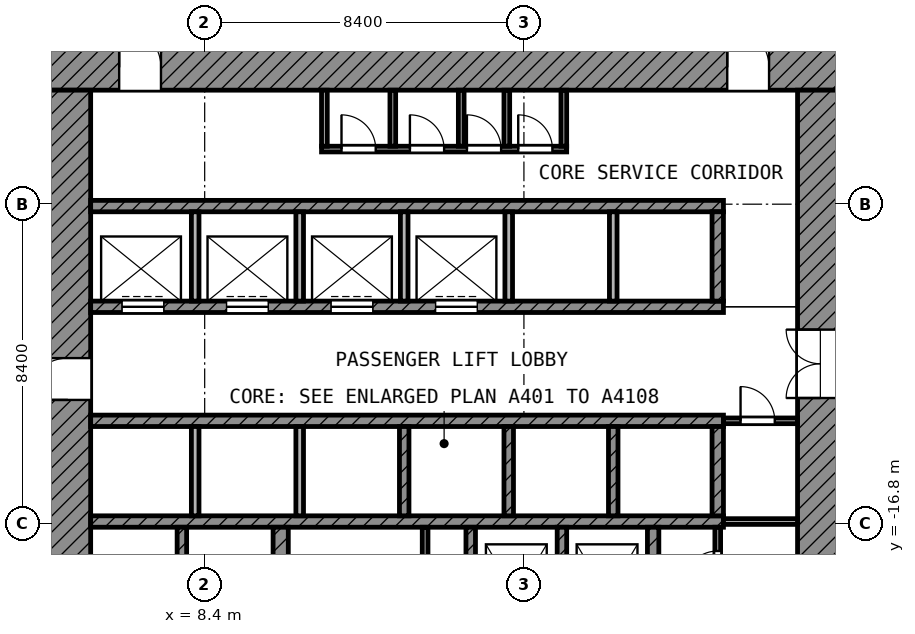
"""IFC4 building model, lengths in metres.
Left out: names, types, materials, properties, quantities, classifications, styles, units other than length and angle.
Written with IfcOpenShell. Run it as: python <this file> out.ifc"""

import sys

from ifc_helpers import new_model, si_unit, direction, frame, frame_2d, origin, place, context, subcontext, project, spatial, rectangle, extrude, element, fill, save


model = new_model("IFC4")
c1 = context("Model", 3, precision=1e-05, world=origin(), true_north=direction((0.0, 1.0)))
c2 = subcontext(c1, "Body", "Model", "MODEL_VIEW")
j1 = project(units=[si_unit("LENGTHUNIT", "METRE"), si_unit("PLANEANGLEUNIT", "RADIAN")], contexts=[c1])
p1 = place(None, origin())
s1 = spatial("IfcSite", under=j1, at=p1, CompositionType="ELEMENT")
p2 = place(p1, origin())
s2 = spatial("IfcBuilding", under=s1, at=p2, CompositionType="ELEMENT")
p3 = place(p2, frame((0.0, 0.0, 29.0)))
s3 = spatial("IfcBuildingStorey", under=s2, at=p3, CompositionType="ELEMENT", Elevation=29.0)
p4 = place(p3, frame((4.2, -4.8, 0.0), z_axis=(0.0, 0.0, 1.0), x_axis=(1.0, 0.0, 0.0)))
e1 = element("IfcWall", 1, at=p4, inside=s3, PredefinedType="SHEAR", context=c2, shape_type="SweptSolid", body=[
    extrude(rectangle(XDim=21.0, YDim=1.2, at=frame_2d((10.5, 0.0))), origin(), (0.0, 0.0, 1.0), 4.7),
])
p5 = place(p4, frame((1.95, 0.0, 0.0)))
e2 = element("IfcOpeningElement", 2, at=p5, cuts=e1, PredefinedType="OPENING", context=c2, shape_type="SweptSolid", body=[
    extrude(rectangle(XDim=1.1, YDim=2.1, at=frame_2d((0.55, 1.05))), frame((0.0, 0.61, 0.0), z_axis=(0.0, -1.0, 0.0), x_axis=(1.0, 0.0, 0.0)), (0.0, 0.0, 1.0), 1.22),
])
p6 = place(p4, frame((17.95, 0.0, 0.0)))
e3 = element("IfcOpeningElement", 3, at=p6, cuts=e1, PredefinedType="OPENING", context=c2, shape_type="SweptSolid", body=[
    extrude(rectangle(XDim=1.1, YDim=2.1, at=frame_2d((0.55, 1.05))), frame((0.0, 0.61, 0.0), z_axis=(0.0, -1.0, 0.0), x_axis=(1.0, 0.0, 0.0)), (0.0, 0.0, 1.0), 1.22),
])
p7 = place(p3, frame((4.8, -25.2, 0.0), z_axis=(0.0, 0.0, 1.0), x_axis=(0.0, 1.0, 0.0)))
e4 = element("IfcWall", 4, at=p7, inside=s3, PredefinedType="SHEAR", context=c2, shape_type="SweptSolid", body=[
    extrude(rectangle(XDim=19.8, YDim=1.2, at=frame_2d((9.9, 0.0))), origin(), (0.0, 0.0, 1.0), 4.7),
])
p8 = place(p7, frame((11.65, 0.0, 0.0)))
e5 = element("IfcOpeningElement", 5, at=p8, cuts=e4, PredefinedType="OPENING", context=c2, shape_type="SweptSolid", body=[
    extrude(rectangle(XDim=1.1, YDim=2.1, at=frame_2d((0.55, 1.05))), frame((0.0, 0.61, 0.0), z_axis=(0.0, -1.0, 0.0), x_axis=(1.0, 0.0, 0.0)), (0.0, 0.0, 1.0), 1.22),
])
p9 = place(p7, frame((2.35, 0.0, 0.0)))
e6 = element("IfcOpeningElement", 6, at=p9, cuts=e4, PredefinedType="OPENING", context=c2, shape_type="SweptSolid", body=[
    extrude(rectangle(XDim=1.1, YDim=2.1, at=frame_2d((0.55, 1.05))), frame((0.0, 0.61, 0.0), z_axis=(0.0, -1.0, 0.0), x_axis=(1.0, 0.0, 0.0)), (0.0, 0.0, 1.0), 1.22),
])
p10 = place(p3, frame((24.6, -24.0, 0.0), z_axis=(0.0, 0.0, 1.0), x_axis=(0.0, 1.0, 0.0)))
e7 = element("IfcWall", 7, at=p10, inside=s3, PredefinedType="SHEAR", context=c2, shape_type="SweptSolid", body=[
    extrude(rectangle(XDim=18.6, YDim=1.2, at=frame_2d((9.3, 0.0))), origin(), (0.0, 0.0, 1.0), 4.7),
])
p11 = place(p10, frame((10.5, 0.0, 0.0)))
e8 = element("IfcOpeningElement", 8, at=p11, cuts=e7, PredefinedType="OPENING", context=c2, shape_type="SweptSolid", body=[
    extrude(rectangle(XDim=1.8, YDim=2.1, at=frame_2d((0.9, 1.05))), frame((0.0, 0.61, 0.0), z_axis=(0.0, -1.0, 0.0), x_axis=(1.0, 0.0, 0.0)), (0.0, 0.0, 1.0), 1.22),
])
p12 = place(p3, frame((5.4, -8.45, 0.0), z_axis=(0.0, 0.0, 1.0), x_axis=(1.0, 0.0, 0.0)))
e9 = element("IfcWall", 9, at=p12, inside=s3, PredefinedType="SHEAR", context=c2, shape_type="SweptSolid", body=[
    extrude(rectangle(XDim=16.65, YDim=0.3, at=frame_2d((8.325, 0.0))), origin(), (0.0, 0.0, 1.0), 4.7),
])
p13 = place(p3, frame((5.4, -11.1, 0.0), z_axis=(0.0, 0.0, 1.0), x_axis=(1.0, 0.0, 0.0)))
e10 = element("IfcWall", 10, at=p13, inside=s3, PredefinedType="SHEAR", context=c2, shape_type="SweptSolid", body=[
    extrude(rectangle(XDim=16.65, YDim=0.3, at=frame_2d((8.325, 0.0))), origin(), (0.0, 0.0, 1.0), 4.7),
])
p14 = place(p13, frame((0.825, 0.0, 0.0)))
e11 = element("IfcOpeningElement", 11, at=p14, cuts=e10, PredefinedType="OPENING", context=c2, shape_type="SweptSolid", body=[
    extrude(rectangle(XDim=1.1, YDim=2.1, at=frame_2d((0.55, 1.05))), frame((0.0, 0.16, 0.0), z_axis=(0.0, -1.0, 0.0), x_axis=(1.0, 0.0, 0.0)), (0.0, 0.0, 1.0), 0.32),
])
p15 = place(p13, frame((3.575, 0.0, 0.0)))
e12 = element("IfcOpeningElement", 12, at=p15, cuts=e10, PredefinedType="OPENING", context=c2, shape_type="SweptSolid", body=[
    extrude(rectangle(XDim=1.1, YDim=2.1, at=frame_2d((0.55, 1.05))), frame((0.0, 0.16, 0.0), z_axis=(0.0, -1.0, 0.0), x_axis=(1.0, 0.0, 0.0)), (0.0, 0.0, 1.0), 0.32),
])
p16 = place(p13, frame((6.325, 0.0, 0.0)))
e13 = element("IfcOpeningElement", 13, at=p16, cuts=e10, PredefinedType="OPENING", context=c2, shape_type="SweptSolid", body=[
    extrude(rectangle(XDim=1.1, YDim=2.1, at=frame_2d((0.55, 1.05))), frame((0.0, 0.16, 0.0), z_axis=(0.0, -1.0, 0.0), x_axis=(1.0, 0.0, 0.0)), (0.0, 0.0, 1.0), 0.32),
])
p17 = place(p13, frame((9.075, 0.0, 0.0)))
e14 = element("IfcOpeningElement", 14, at=p17, cuts=e10, PredefinedType="OPENING", context=c2, shape_type="SweptSolid", body=[
    extrude(rectangle(XDim=1.1, YDim=2.1, at=frame_2d((0.55, 1.05))), frame((0.0, 0.16, 0.0), z_axis=(0.0, -1.0, 0.0), x_axis=(1.0, 0.0, 0.0)), (0.0, 0.0, 1.0), 0.32),
])
for number, where, z_axis, x_axis in (
    (15, (5.4, -14.1, 0.0), (0.0, 0.0, 1.0), (1.0, 0.0, 0.0)),
    (16, (5.4, -16.75, 0.0), (0.0, 0.0, 1.0), (1.0, 0.0, 0.0)),
):
    element("IfcWall", number, at=place(p3, frame(where, z_axis=z_axis, x_axis=x_axis)), inside=s3, PredefinedType="SHEAR", context=c2, shape_type="SweptSolid", body=[
        extrude(rectangle(XDim=16.65, YDim=0.3, at=frame_2d((8.325, 0.0))), origin(), (0.0, 0.0, 1.0), 4.7),
    ])
p18 = place(p3, frame((10.4, -20.05, 0.0), z_axis=(0.0, 0.0, 1.0), x_axis=(0.0, 1.0, 0.0)))
e17 = element("IfcWall", 17, at=p18, inside=s3, PredefinedType="SHEAR", context=c2, shape_type="SweptSolid", body=[
    extrude(rectangle(XDim=3.15, YDim=0.4, at=frame_2d((1.575, 0.0))), origin(), (0.0, 0.0, 1.0), 4.7),
])
p19 = place(p3, frame((20.2, -20.35, 0.0), z_axis=(0.0, 0.0, 1.0), x_axis=(0.0, 1.0, 0.0)))
e18 = element("IfcWall", 18, at=p19, inside=s3, PredefinedType="SHEAR", context=c2, shape_type="SweptSolid", body=[
    extrude(rectangle(XDim=3.45, YDim=0.3, at=frame_2d((1.725, 0.0))), origin(), (0.0, 0.0, 1.0), 4.7),
])
p20 = place(p3, frame((21.9, -10.95, 0.0), z_axis=(0.0, 0.0, 1.0), x_axis=(0.0, 1.0, 0.0)))
e19 = element("IfcWall", 19, at=p20, inside=s3, PredefinedType="SHEAR", context=c2, shape_type="SweptSolid", body=[
    extrude(rectangle(XDim=2.35, YDim=0.3, at=frame_2d((1.175, 0.0))), origin(), (0.0, 0.0, 1.0), 4.7),
])
p21 = place(p3, frame((21.9, -16.6, 0.0), z_axis=(0.0, 0.0, 1.0), x_axis=(0.0, 1.0, 0.0)))
e20 = element("IfcWall", 20, at=p21, inside=s3, PredefinedType="SHEAR", context=c2, shape_type="SweptSolid", body=[
    extrude(rectangle(XDim=2.35, YDim=0.3, at=frame_2d((1.175, 0.0))), origin(), (0.0, 0.0, 1.0), 4.7),
])
for number, where, z_axis, x_axis in (
    (21, (7.8, -20.05, 0.0), (0.0, 0.0, 1.0), (0.0, 1.0, 0.0)),
    (22, (15.4, -20.05, 0.0), (0.0, 0.0, 1.0), (0.0, 1.0, 0.0)),
    (23, (17.8, -20.05, 0.0), (0.0, 0.0, 1.0), (0.0, 1.0, 0.0)),
):
    element("IfcWall", number, at=place(p3, frame(where, z_axis=z_axis, x_axis=x_axis)), inside=s3, PredefinedType="SHEAR", context=c2, shape_type="SweptSolid", body=[
        extrude(rectangle(XDim=3.15, YDim=0.25, at=frame_2d((1.575, 0.0))), origin(), (0.0, 0.0, 1.0), 4.7),
    ])
for number, where, z_axis, x_axis in (
    (24, (8.15, -10.95, 0.0), (0.0, 0.0, 1.0), (0.0, 1.0, 0.0)),
    (25, (10.9, -10.95, 0.0), (0.0, 0.0, 1.0), (0.0, 1.0, 0.0)),
    (26, (13.65, -10.95, 0.0), (0.0, 0.0, 1.0), (0.0, 1.0, 0.0)),
    (27, (16.4, -10.95, 0.0), (0.0, 0.0, 1.0), (0.0, 1.0, 0.0)),
    (28, (19.15, -10.95, 0.0), (0.0, 0.0, 1.0), (0.0, 1.0, 0.0)),
):
    element("IfcWall", number, at=place(p3, frame(where, z_axis=z_axis, x_axis=x_axis)), inside=s3, PredefinedType="PARTITIONING", context=c2, shape_type="SweptSolid", body=[
        extrude(rectangle(XDim=2.35, YDim=0.2, at=frame_2d((1.175, 0.0))), origin(), (0.0, 0.0, 1.0), 4.7),
    ])
for number, where, z_axis, x_axis in (
    (29, (8.15, -16.6, 0.0), (0.0, 0.0, 1.0), (0.0, 1.0, 0.0)),
    (30, (10.9, -16.6, 0.0), (0.0, 0.0, 1.0), (0.0, 1.0, 0.0)),
):
    element("IfcWall", number, at=place(p3, frame(where, z_axis=z_axis, x_axis=x_axis)), inside=s3, PredefinedType="PARTITIONING", context=c2, shape_type="SweptSolid", body=[
        extrude(rectangle(XDim=2.35, YDim=0.2, at=frame_2d((1.175, 0.0))), origin(), (0.0, 0.0, 1.0), 4.7),
    ])
for number, where, z_axis, x_axis in (
    (31, (13.65, -16.6, 0.0), (0.0, 0.0, 1.0), (0.0, 1.0, 0.0)),
    (32, (16.4, -16.6, 0.0), (0.0, 0.0, 1.0), (0.0, 1.0, 0.0)),
    (33, (19.15, -16.6, 0.0), (0.0, 0.0, 1.0), (0.0, 1.0, 0.0)),
):
    element("IfcWall", number, at=place(p3, frame(where, z_axis=z_axis, x_axis=x_axis)), inside=s3, PredefinedType="SHEAR", context=c2, shape_type="SweptSolid", body=[
        extrude(rectangle(XDim=2.35, YDim=0.25, at=frame_2d((1.175, 0.0))), origin(), (0.0, 0.0, 1.0), 4.7),
    ])
p22 = place(p3, frame((21.9, -19.05, 0.0), z_axis=(0.0, 0.0, 1.0), x_axis=(0.0, 1.0, 0.0)))
e34 = element("IfcWall", 34, at=p22, inside=s3, PredefinedType="PARTITIONING", context=c2, shape_type="SweptSolid", body=[
    extrude(rectangle(XDim=2.15, YDim=0.15, at=frame_2d((1.075, 0.0))), origin(), (0.0, 0.0, 1.0), 4.7),
])
p23 = place(p22, frame((0.625, 0.0, 0.0)))
e35 = element("IfcOpeningElement", 35, at=p23, cuts=e34, PredefinedType="OPENING", context=c2, shape_type="SweptSolid", body=[
    extrude(rectangle(XDim=0.9, YDim=2.1, at=frame_2d((0.45, 1.05))), frame((0.0, 0.085, 0.0), z_axis=(0.0, -1.0, 0.0), x_axis=(1.0, 0.0, 0.0)), (0.0, 0.0, 1.0), 0.17),
])
p24 = place(p3, frame((22.05, -16.75, 0.0), z_axis=(0.0, 0.0, 1.0), x_axis=(1.0, 0.0, 0.0)))
e36 = element("IfcWall", 36, at=p24, inside=s3, PredefinedType="PARTITIONING", context=c2, shape_type="SweptSolid", body=[
    extrude(rectangle(XDim=1.95, YDim=0.15, at=frame_2d((0.975, 0.0))), origin(), (0.0, 0.0, 1.0), 4.7),
])
p25 = place(p3, frame((22.05, -14.1, 0.0), z_axis=(0.0, 0.0, 1.0), x_axis=(1.0, 0.0, 0.0)))
e37 = element("IfcWall", 37, at=p25, inside=s3, PredefinedType="PARTITIONING", context=c2, shape_type="SweptSolid", body=[
    extrude(rectangle(XDim=1.95, YDim=0.15, at=frame_2d((0.975, 0.0))), origin(), (0.0, 0.0, 1.0), 4.7),
])
p26 = place(p25, frame((0.45, 0.0, 0.0)))
e38 = element("IfcOpeningElement", 38, at=p26, cuts=e37, PredefinedType="OPENING", context=c2, shape_type="SweptSolid", body=[
    extrude(rectangle(XDim=0.9, YDim=2.1, at=frame_2d((0.45, 1.05))), frame((0.0, 0.085, 0.0), z_axis=(0.0, -1.0, 0.0), x_axis=(1.0, 0.0, 0.0)), (0.0, 0.0, 1.0), 0.17),
])
p27 = place(p3, frame((11.475, -6.95, 0.0), z_axis=(0.0, 0.0, 1.0), x_axis=(1.0, 0.0, 0.0)))
e39 = element("IfcWall", 39, at=p27, inside=s3, PredefinedType="PARTITIONING", context=c2, shape_type="SweptSolid", body=[
    extrude(rectangle(XDim=6.45, YDim=0.15, at=frame_2d((3.225, 0.0))), origin(), (0.0, 0.0, 1.0), 4.7),
])
p28 = place(p27, frame((0.525, 0.0, 0.0)))
e40 = element("IfcOpeningElement", 40, at=p28, cuts=e39, PredefinedType="OPENING", context=c2, shape_type="SweptSolid", body=[
    extrude(rectangle(XDim=0.9, YDim=2.1, at=frame_2d((0.45, 1.05))), frame((0.0, 0.085, 0.0), z_axis=(0.0, -1.0, 0.0), x_axis=(1.0, 0.0, 0.0)), (0.0, 0.0, 1.0), 0.17),
])
p29 = place(p27, frame((2.325, 0.0, 0.0)))
e41 = element("IfcOpeningElement", 41, at=p29, cuts=e39, PredefinedType="OPENING", context=c2, shape_type="SweptSolid", body=[
    extrude(rectangle(XDim=0.9, YDim=2.1, at=frame_2d((0.45, 1.05))), frame((0.0, 0.085, 0.0), z_axis=(0.0, -1.0, 0.0), x_axis=(1.0, 0.0, 0.0)), (0.0, 0.0, 1.0), 0.17),
])
p30 = place(p27, frame((3.825, 0.0, 0.0)))
e42 = element("IfcOpeningElement", 42, at=p30, cuts=e39, PredefinedType="OPENING", context=c2, shape_type="SweptSolid", body=[
    extrude(rectangle(XDim=0.9, YDim=2.1, at=frame_2d((0.45, 1.05))), frame((0.0, 0.085, 0.0), z_axis=(0.0, -1.0, 0.0), x_axis=(1.0, 0.0, 0.0)), (0.0, 0.0, 1.0), 0.17),
])
p31 = place(p27, frame((5.175, 0.0, 0.0)))
e43 = element("IfcOpeningElement", 43, at=p31, cuts=e39, PredefinedType="OPENING", context=c2, shape_type="SweptSolid", body=[
    extrude(rectangle(XDim=0.9, YDim=2.1, at=frame_2d((0.45, 1.05))), frame((0.0, 0.085, 0.0), z_axis=(0.0, -1.0, 0.0), x_axis=(1.0, 0.0, 0.0)), (0.0, 0.0, 1.0), 0.17),
])
for number, where, z_axis, x_axis in (
    (44, (11.55, -6.875, 0.0), (0.0, 0.0, 1.0), (0.0, 1.0, 0.0)),
    (45, (13.35, -6.875, 0.0), (0.0, 0.0, 1.0), (0.0, 1.0, 0.0)),
):
    element("IfcWall", number, at=place(p3, frame(where, z_axis=z_axis, x_axis=x_axis)), inside=s3, PredefinedType="PARTITIONING", context=c2, shape_type="SweptSolid", body=[
        extrude(rectangle(XDim=1.475, YDim=0.15, at=frame_2d((0.738, 0.0))), origin(), (0.0, 0.0, 1.0), 4.7),
    ])
p32 = place(p3, frame((14.2, -20.05, 0.0), z_axis=(0.0, 0.0, 1.0), x_axis=(0.0, 1.0, 0.0)))
e46 = element("IfcWall", 46, at=p32, inside=s3, PredefinedType="PARTITIONING", context=c2, shape_type="SweptSolid", body=[
    extrude(rectangle(XDim=3.15, YDim=0.15, at=frame_2d((1.575, 0.0))), origin(), (0.0, 0.0, 1.0), 4.7),
])
for number, where, z_axis, x_axis in (
    (47, (15.15, -6.875, 0.0), (0.0, 0.0, 1.0), (0.0, 1.0, 0.0)),
    (48, (16.35, -6.875, 0.0), (0.0, 0.0, 1.0), (0.0, 1.0, 0.0)),
    (49, (17.85, -6.875, 0.0), (0.0, 0.0, 1.0), (0.0, 1.0, 0.0)),
):
    element("IfcWall", number, at=place(p3, frame(where, z_axis=z_axis, x_axis=x_axis)), inside=s3, PredefinedType="PARTITIONING", context=c2, shape_type="SweptSolid", body=[
        extrude(rectangle(XDim=1.475, YDim=0.15, at=frame_2d((0.738, 0.0))), origin(), (0.0, 0.0, 1.0), 4.7),
    ])
p33 = place(p14, origin())
e50 = element("IfcDoor", 50, at=p33, inside=s3, OperationType="DOUBLE_DOOR_SLIDING", PredefinedType="DOOR", context=c2, shape_type="SweptSolid", body=[
    extrude(rectangle(XDim=1.1, YDim=2.1, at=frame_2d((0.55, 1.05))), frame((0.0, 0.025, 0.0), z_axis=(0.0, -1.0, 0.0), x_axis=(1.0, 0.0, 0.0)), (0.0, 0.0, 1.0), 0.05),
])
fill(e11, e50)
p34 = place(p15, origin())
e51 = element("IfcDoor", 51, at=p34, inside=s3, OperationType="DOUBLE_DOOR_SLIDING", PredefinedType="DOOR", context=c2, shape_type="SweptSolid", body=[
    extrude(rectangle(XDim=1.1, YDim=2.1, at=frame_2d((0.55, 1.05))), frame((0.0, 0.025, 0.0), z_axis=(0.0, -1.0, 0.0), x_axis=(1.0, 0.0, 0.0)), (0.0, 0.0, 1.0), 0.05),
])
fill(e12, e51)
p35 = place(p16, origin())
e52 = element("IfcDoor", 52, at=p35, inside=s3, OperationType="DOUBLE_DOOR_SLIDING", PredefinedType="DOOR", context=c2, shape_type="SweptSolid", body=[
    extrude(rectangle(XDim=1.1, YDim=2.1, at=frame_2d((0.55, 1.05))), frame((0.0, 0.025, 0.0), z_axis=(0.0, -1.0, 0.0), x_axis=(1.0, 0.0, 0.0)), (0.0, 0.0, 1.0), 0.05),
])
fill(e13, e52)
p36 = place(p17, origin())
e53 = element("IfcDoor", 53, at=p36, inside=s3, OperationType="DOUBLE_DOOR_SLIDING", PredefinedType="DOOR", context=c2, shape_type="SweptSolid", body=[
    extrude(rectangle(XDim=1.1, YDim=2.1, at=frame_2d((0.55, 1.05))), frame((0.0, 0.025, 0.0), z_axis=(0.0, -1.0, 0.0), x_axis=(1.0, 0.0, 0.0)), (0.0, 0.0, 1.0), 0.05),
])
fill(e14, e53)
p37 = place(p8, origin())
e54 = element("IfcDoor", 54, at=p37, inside=s3, OperationType="SINGLE_SWING_LEFT", PredefinedType="DOOR", context=c2, shape_type="SweptSolid", body=[
    extrude(rectangle(XDim=1.1, YDim=2.1, at=frame_2d((0.55, 1.05))), frame((0.0, 0.025, 0.0), z_axis=(0.0, -1.0, 0.0), x_axis=(1.0, 0.0, 0.0)), (0.0, 0.0, 1.0), 0.05),
])
fill(e5, e54)
p38 = place(p5, origin())
e55 = element("IfcDoor", 55, at=p38, inside=s3, OperationType="SINGLE_SWING_LEFT", PredefinedType="DOOR", context=c2, shape_type="SweptSolid", body=[
    extrude(rectangle(XDim=1.1, YDim=2.1, at=frame_2d((0.55, 1.05))), frame((0.0, 0.025, 0.0), z_axis=(0.0, -1.0, 0.0), x_axis=(1.0, 0.0, 0.0)), (0.0, 0.0, 1.0), 0.05),
])
fill(e2, e55)
p39 = place(p6, origin())
e56 = element("IfcDoor", 56, at=p39, inside=s3, OperationType="SINGLE_SWING_LEFT", PredefinedType="DOOR", context=c2, shape_type="SweptSolid", body=[
    extrude(rectangle(XDim=1.1, YDim=2.1, at=frame_2d((0.55, 1.05))), frame((0.0, 0.025, 0.0), z_axis=(0.0, -1.0, 0.0), x_axis=(1.0, 0.0, 0.0)), (0.0, 0.0, 1.0), 0.05),
])
fill(e3, e56)
p40 = place(p11, origin())
e57 = element("IfcDoor", 57, at=p40, inside=s3, OperationType="DOUBLE_DOOR_SINGLE_SWING", PredefinedType="DOOR", context=c2, shape_type="SweptSolid", body=[
    extrude(rectangle(XDim=1.8, YDim=2.1, at=frame_2d((0.9, 1.05))), frame((0.0, 0.025, 0.0), z_axis=(0.0, -1.0, 0.0), x_axis=(1.0, 0.0, 0.0)), (0.0, 0.0, 1.0), 0.05),
])
fill(e8, e57)
p41 = place(p28, origin())
e58 = element("IfcDoor", 58, at=p41, inside=s3, OperationType="SINGLE_SWING_LEFT", PredefinedType="DOOR", context=c2, shape_type="SweptSolid", body=[
    extrude(rectangle(XDim=0.9, YDim=2.1, at=frame_2d((0.45, 1.05))), frame((0.0, 0.025, 0.0), z_axis=(0.0, -1.0, 0.0), x_axis=(1.0, 0.0, 0.0)), (0.0, 0.0, 1.0), 0.05),
])
fill(e40, e58)
p42 = place(p29, origin())
e59 = element("IfcDoor", 59, at=p42, inside=s3, OperationType="SINGLE_SWING_LEFT", PredefinedType="DOOR", context=c2, shape_type="SweptSolid", body=[
    extrude(rectangle(XDim=0.9, YDim=2.1, at=frame_2d((0.45, 1.05))), frame((0.0, 0.025, 0.0), z_axis=(0.0, -1.0, 0.0), x_axis=(1.0, 0.0, 0.0)), (0.0, 0.0, 1.0), 0.05),
])
fill(e41, e59)
p43 = place(p30, origin())
e60 = element("IfcDoor", 60, at=p43, inside=s3, OperationType="SINGLE_SWING_LEFT", PredefinedType="DOOR", context=c2, shape_type="SweptSolid", body=[
    extrude(rectangle(XDim=0.9, YDim=2.1, at=frame_2d((0.45, 1.05))), frame((0.0, 0.025, 0.0), z_axis=(0.0, -1.0, 0.0), x_axis=(1.0, 0.0, 0.0)), (0.0, 0.0, 1.0), 0.05),
])
fill(e42, e60)
p44 = place(p31, origin())
e61 = element("IfcDoor", 61, at=p44, inside=s3, OperationType="SINGLE_SWING_LEFT", PredefinedType="DOOR", context=c2, shape_type="SweptSolid", body=[
    extrude(rectangle(XDim=0.9, YDim=2.1, at=frame_2d((0.45, 1.05))), frame((0.0, 0.025, 0.0), z_axis=(0.0, -1.0, 0.0), x_axis=(1.0, 0.0, 0.0)), (0.0, 0.0, 1.0), 0.05),
])
fill(e43, e61)
p45 = place(p26, origin())
e62 = element("IfcDoor", 62, at=p45, inside=s3, OperationType="SINGLE_SWING_LEFT", PredefinedType="DOOR", context=c2, shape_type="SweptSolid", body=[
    extrude(rectangle(XDim=0.9, YDim=2.1, at=frame_2d((0.45, 1.05))), frame((0.0, 0.025, 0.0), z_axis=(0.0, -1.0, 0.0), x_axis=(1.0, 0.0, 0.0)), (0.0, 0.0, 1.0), 0.05),
])
fill(e38, e62)
p46 = place(p23, origin())
e63 = element("IfcDoor", 63, at=p46, inside=s3, OperationType="SINGLE_SWING_LEFT", PredefinedType="DOOR", context=c2, shape_type="SweptSolid", body=[
    extrude(rectangle(XDim=0.9, YDim=2.1, at=frame_2d((0.45, 1.05))), frame((0.0, 0.025, 0.0), z_axis=(0.0, -1.0, 0.0), x_axis=(1.0, 0.0, 0.0)), (0.0, 0.0, 1.0), 0.05),
])
fill(e35, e63)
save(model, sys.argv[1])
